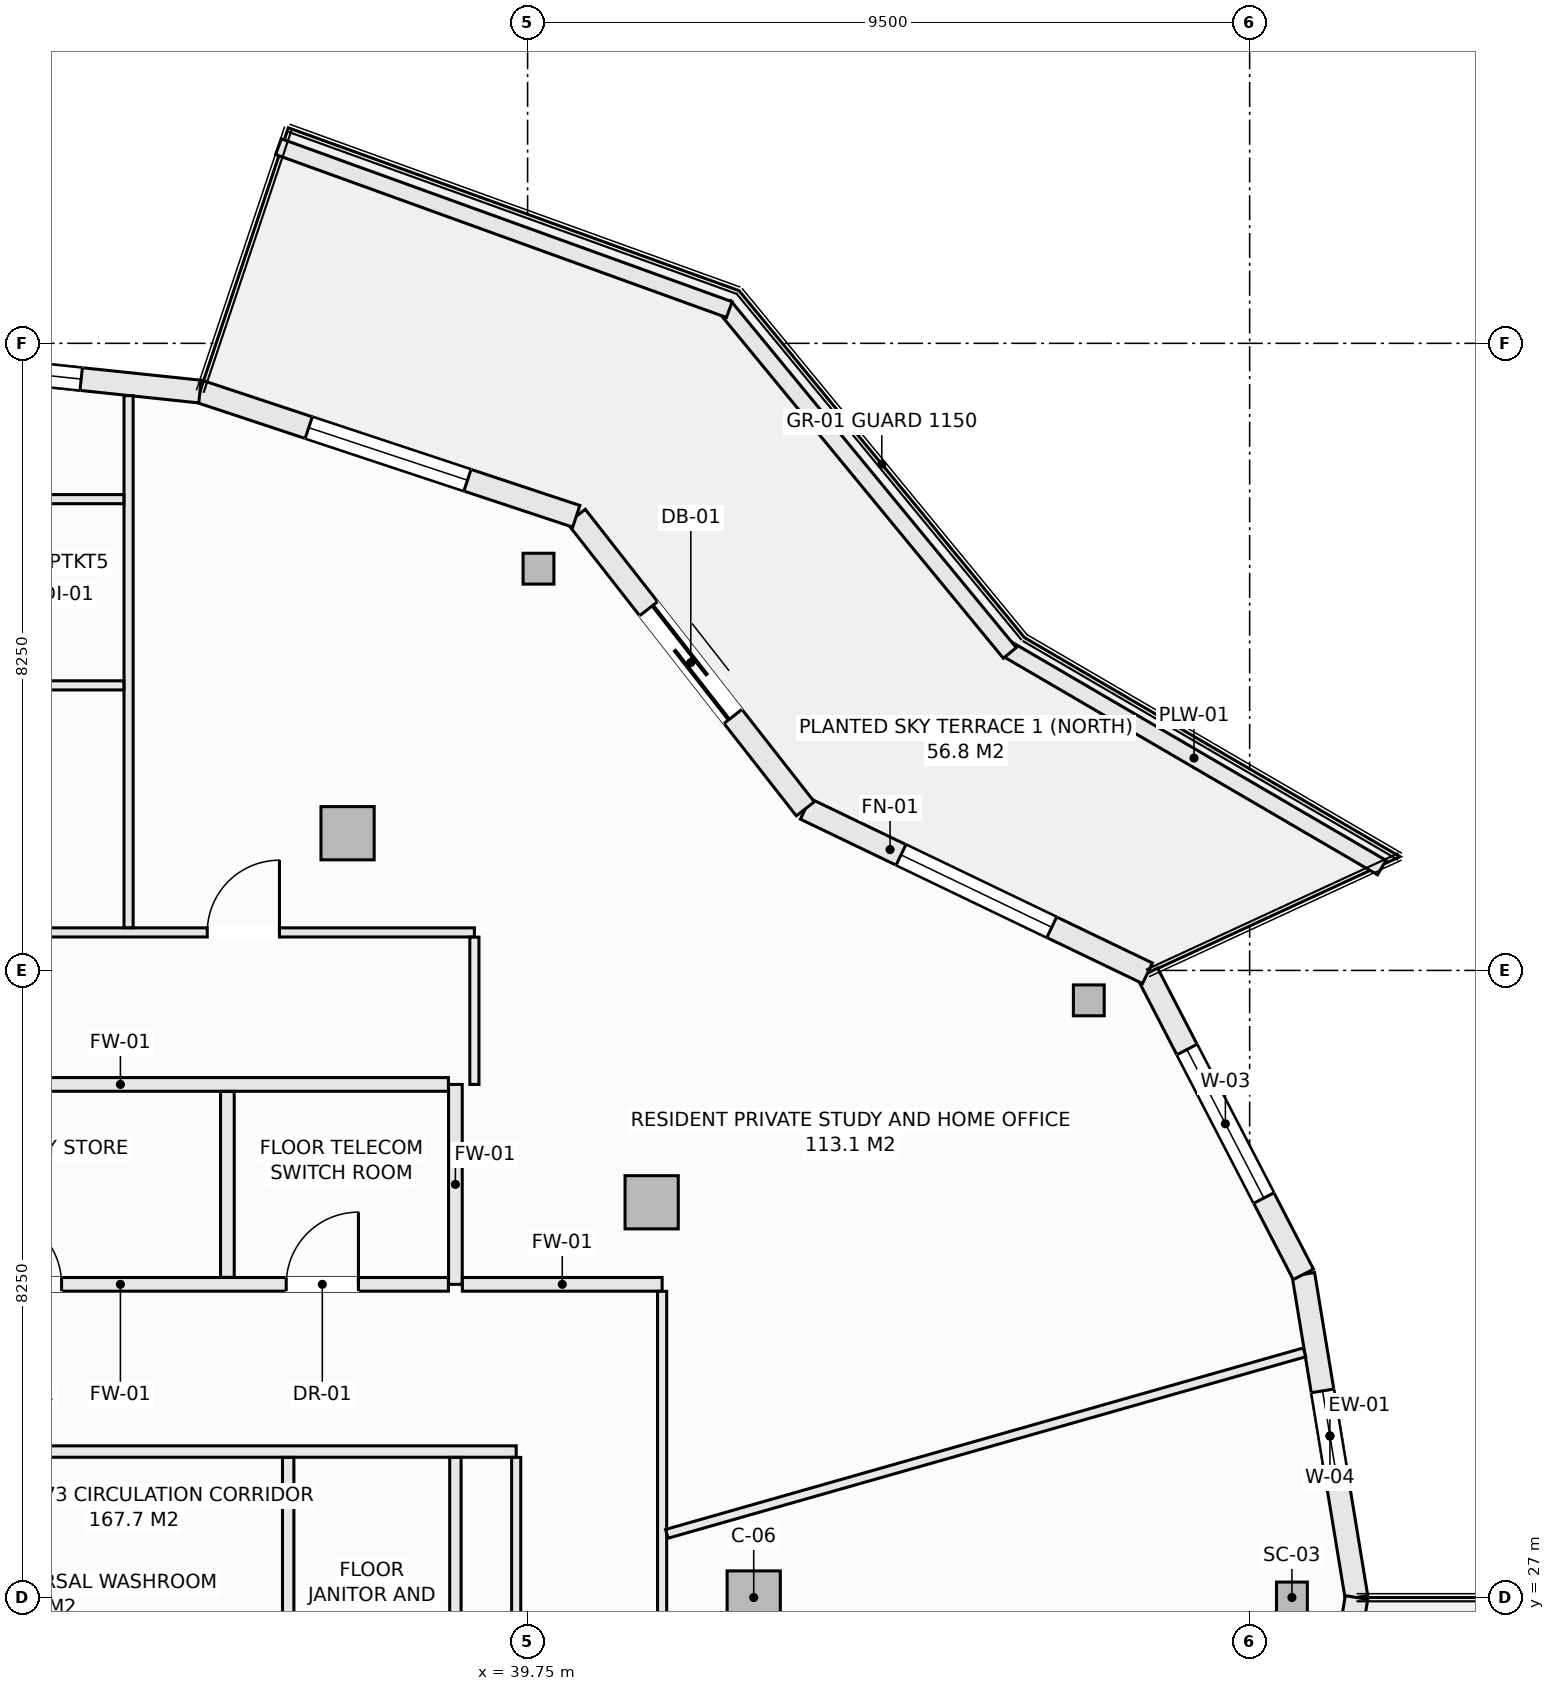
"""IFC4 building model, lengths in metres.
Left out: names, types, materials, properties, quantities, classifications, styles, units other than length and angle.
Written with IfcOpenShell. Run it as: python <this file> out.ifc"""

import sys

from ifc_helpers import new_model, si_unit, direction, frame, frame_2d, origin, origin_2d, place, context, subcontext, project, spatial, rectangle, hollow_rectangle, extrude, element, fill, save


model = new_model("IFC4")
c1 = context("Model", 3, precision=1e-05, world=origin(), true_north=direction((0.0, 1.0)))
c2 = subcontext(c1, "Body", "Model", "MODEL_VIEW")
j1 = project(units=[si_unit("LENGTHUNIT", "METRE"), si_unit("PLANEANGLEUNIT", "RADIAN")], contexts=[c1])
p1 = place(None, origin())
s1 = spatial("IfcSite", under=j1, at=p1, CompositionType="ELEMENT")
p2 = place(p1, origin())
s2 = spatial("IfcBuilding", under=s1, at=p2, CompositionType="ELEMENT")
p3 = place(p2, frame((0.0, 0.0, 269.0)))
s3 = spatial("IfcBuildingStorey", under=s2, at=p3, CompositionType="ELEMENT", Elevation=269.0)
for number, where, z_axis, x_axis in (
    (1, (49.806, 27.0, -0.27), (0.0, 0.0, 1.0), (1.0, 0.0, 0.0)),
    (2, (47.134, 34.856, -0.27), (0.0, 0.0, 1.0), (1.0, 0.0, 0.0)),
    (3, (39.893, 40.535, -0.27), (0.0, 0.0, 1.0), (1.0, 0.0, 0.0)),
):
    element("IfcColumn", number, at=place(p3, frame(where, z_axis=z_axis, x_axis=x_axis)), inside=s3, PredefinedType="COLUMN", context=c2, shape_type="SweptSolid", body=[
        extrude(hollow_rectangle(XDim=0.406, YDim=0.406, WallThickness=0.016, at=origin_2d()), origin(), (0.0, 0.0, 1.0), 3.3),
    ])
for number, where, z_axis, x_axis in (
    (4, (42.725, 27.0, -0.27), (0.0, 0.0, 1.0), (1.0, 0.0, 0.0)),
    (5, (41.382, 32.199, -0.27), (0.0, 0.0, 1.0), (1.0, 0.0, 0.0)),
    (6, (37.382, 37.055, -0.27), (0.0, 0.0, 1.0), (1.0, 0.0, 0.0)),
):
    element("IfcColumn", number, at=place(p3, frame(where, z_axis=z_axis, x_axis=x_axis)), inside=s3, PredefinedType="COLUMN", context=c2, shape_type="SweptSolid", body=[
        extrude(rectangle(XDim=0.7, YDim=0.7, at=origin_2d()), origin(), (0.0, 0.0, 1.0), 3.3),
    ])
p4 = place(p3, frame((49.957, 31.251, 0.0), z_axis=(0.0, 0.0, 1.0), x_axis=(0.162404622434, -0.98672424649, 0.0)))
e7 = element("IfcWall", 7, at=p4, inside=s3, PredefinedType="SOLIDWALL", context=c2, shape_type="SweptSolid", body=[
    extrude(rectangle(XDim=4.308, YDim=0.3, at=frame_2d((2.154, 0.0))), origin(), (0.0, 0.0, 1.0), 2.605),
])
p5 = place(p4, frame((1.554, 0.0, 0.72)))
e8 = element("IfcOpeningElement", 8, at=p5, cuts=e7, PredefinedType="OPENING", context=c2, shape_type="SweptSolid", body=[
    extrude(rectangle(XDim=1.2, YDim=1.65, at=frame_2d((0.6, 0.825))), frame((0.0, 0.16, 0.0), z_axis=(0.0, -1.0, 0.0), x_axis=(1.0, 0.0, 0.0)), (0.0, 0.0, 1.0), 0.32),
])
p6 = place(p3, frame((47.906, 35.212, 0.0), z_axis=(0.0, 0.0, 1.0), x_axis=(0.459801070243, -0.888021945564, 0.0)))
e9 = element("IfcWall", 9, at=p6, inside=s3, PredefinedType="SOLIDWALL", context=c2, shape_type="SweptSolid", body=[
    extrude(rectangle(XDim=4.461, YDim=0.3, at=frame_2d((2.23, 0.0))), origin(), (0.0, 0.0, 1.0), 2.605),
])
p7 = place(p6, frame((1.13, 0.0, 0.72)))
e10 = element("IfcOpeningElement", 10, at=p7, cuts=e9, PredefinedType="OPENING", context=c2, shape_type="SweptSolid", body=[
    extrude(rectangle(XDim=2.2, YDim=1.65, at=frame_2d((1.1, 0.825))), frame((0.0, 0.16, 0.0), z_axis=(0.0, -1.0, 0.0), x_axis=(1.0, 0.0, 0.0)), (0.0, 0.0, 1.0), 0.32),
])
p8 = place(p3, frame((43.404, 37.375, 0.0), z_axis=(0.0, 0.0, 1.0), x_axis=(0.901346013132, -0.433099716706, 0.0)))
e11 = element("IfcWall", 11, at=p8, inside=s3, PredefinedType="SOLIDWALL", context=c2, shape_type="SweptSolid", body=[
    extrude(rectangle(XDim=4.994, YDim=0.3, at=frame_2d((2.497, 0.0))), origin(), (0.0, 0.0, 1.0), 2.605),
])
p9 = place(p8, frame((1.397, 0.0, 0.72)))
e12 = element("IfcOpeningElement", 12, at=p9, cuts=e11, PredefinedType="OPENING", context=c2, shape_type="SweptSolid", body=[
    extrude(rectangle(XDim=2.2, YDim=1.65, at=frame_2d((1.1, 0.825))), frame((0.0, 0.16, 0.0), z_axis=(0.0, -1.0, 0.0), x_axis=(1.0, 0.0, 0.0)), (0.0, 0.0, 1.0), 0.32),
])
p10 = place(p3, frame((40.391, 41.225, 0.0), z_axis=(0.0, 0.0, 1.0), x_axis=(0.616413297421, -0.78742278781, 0.0)))
e13 = element("IfcWall", 13, at=p10, inside=s3, PredefinedType="SOLIDWALL", context=c2, shape_type="SweptSolid", body=[
    extrude(rectangle(XDim=4.888, YDim=0.3, at=frame_2d((2.444, 0.0))), origin(), (0.0, 0.0, 1.0), 2.605),
])
p11 = place(p10, frame((1.544, 0.0, 0.0)))
e14 = element("IfcOpeningElement", 14, at=p11, cuts=e13, PredefinedType="OPENING", context=c2, shape_type="SweptSolid", body=[
    extrude(rectangle(XDim=1.8, YDim=2.25, at=frame_2d((0.9, 1.125))), frame((0.0, 0.16, 0.0), z_axis=(0.0, -1.0, 0.0), x_axis=(1.0, 0.0, 0.0)), (0.0, 0.0, 1.0), 0.32),
])
p12 = place(p3, frame((35.439, 42.865, 0.0), z_axis=(0.0, 0.0, 1.0), x_axis=(0.949252744709, -0.314514271001, 0.0)))
e15 = element("IfcWall", 15, at=p12, inside=s3, PredefinedType="SOLIDWALL", context=c2, shape_type="SweptSolid", body=[
    extrude(rectangle(XDim=5.216, YDim=0.3, at=frame_2d((2.608, 0.0))), origin(), (0.0, 0.0, 1.0), 2.605),
])
p13 = place(p12, frame((1.508, 0.0, 0.72)))
e16 = element("IfcOpeningElement", 16, at=p13, cuts=e15, PredefinedType="OPENING", context=c2, shape_type="SweptSolid", body=[
    extrude(rectangle(XDim=2.2, YDim=1.65, at=frame_2d((1.1, 0.825))), frame((0.0, 0.16, 0.0), z_axis=(0.0, -1.0, 0.0), x_axis=(1.0, 0.0, 0.0)), (0.0, 0.0, 1.0), 0.32),
])
p14 = place(p3, frame((30.125, 43.425, 0.0), z_axis=(0.0, 0.0, 1.0), x_axis=(0.9944966869, -0.104768028258, 0.0)))
e17 = element("IfcWall", 17, at=p14, inside=s3, PredefinedType="SOLIDWALL", context=c2, shape_type="SweptSolid", body=[
    extrude(rectangle(XDim=5.343, YDim=0.3, at=frame_2d((2.672, 0.0))), origin(), (0.0, 0.0, 1.0), 2.605),
])
p15 = place(p14, frame((1.572, 0.0, 0.72)))
e18 = element("IfcOpeningElement", 18, at=p15, cuts=e17, PredefinedType="OPENING", context=c2, shape_type="SweptSolid", body=[
    extrude(rectangle(XDim=2.2, YDim=1.65, at=frame_2d((1.1, 0.825))), frame((0.0, 0.16, 0.0), z_axis=(0.0, -1.0, 0.0), x_axis=(1.0, 0.0, 0.0)), (0.0, 0.0, 1.0), 0.32),
])
p16 = place(p3, frame((49.957, 22.749, 0.0), z_axis=(0.0, 0.0, 1.0), x_axis=(0.162404622434, 0.98672424649, 0.0)))
e19 = element("IfcWall", 19, at=p16, inside=s3, PredefinedType="SOLIDWALL", context=c2, shape_type="SweptSolid", body=[
    extrude(rectangle(XDim=4.308, YDim=0.3, at=frame_2d((2.154, 0.0))), origin(), (0.0, 0.0, 1.0), 2.605),
])
p17 = place(p16, frame((1.054, 0.0, 0.72)))
e20 = element("IfcOpeningElement", 20, at=p17, cuts=e19, PredefinedType="OPENING", context=c2, shape_type="SweptSolid", body=[
    extrude(rectangle(XDim=2.2, YDim=1.65, at=frame_2d((1.1, 0.825))), frame((0.0, 0.16, 0.0), z_axis=(0.0, -1.0, 0.0), x_axis=(1.0, 0.0, 0.0)), (0.0, 0.0, 1.0), 0.32),
])
p18 = place(p3, frame((46.048, 39.485, 0.0), z_axis=(0.0, 0.0, 1.0), x_axis=(0.863803671285, -0.503828559606, 0.0)))
e21 = element("IfcWall", 21, at=p18, inside=s3, PredefinedType="PARAPET", context=c2, shape_type="SweptSolid", body=[
    extrude(rectangle(XDim=5.719, YDim=0.22, at=frame_2d((2.86, 0.0))), origin(), (0.0, 0.0, 1.0), 0.52),
])
p19 = place(p3, frame((42.339, 43.99, 0.0), z_axis=(0.0, 0.0, 1.0), x_axis=(0.635450933862, -0.772141250455, 0.0)))
e22 = element("IfcWall", 22, at=p19, inside=s3, PredefinedType="PARAPET", context=c2, shape_type="SweptSolid", body=[
    extrude(rectangle(XDim=5.91, YDim=0.22, at=frame_2d((2.955, 0.0))), origin(), (0.0, 0.0, 1.0), 0.52),
])
p20 = place(p3, frame((36.473, 46.087, 0.0), z_axis=(0.0, 0.0, 1.0), x_axis=(0.940465240036, -0.339889882585, 0.0)))
e23 = element("IfcWall", 23, at=p20, inside=s3, PredefinedType="PARAPET", context=c2, shape_type="SweptSolid", body=[
    extrude(rectangle(XDim=6.307, YDim=0.22, at=frame_2d((3.153, 0.0))), origin(), (0.0, 0.0, 1.0), 0.52),
])
p21 = place(p3, frame((30.077, 28.92, 0.0), z_axis=(0.0, 0.0, 1.0), x_axis=(1.0, 0.0, 0.0)))
e24 = element("IfcWall", 24, at=p21, inside=s3, PredefinedType="PARTITIONING", context=c2, shape_type="SweptSolid", body=[
    extrude(rectangle(XDim=9.523, YDim=0.15, at=frame_2d((4.762, 0.0))), origin(), (0.0, 0.0, 1.0), 3.03),
])
for number, where, z_axis, x_axis in (
    (25, (36.6, 25.197, 0.0), (0.0, 0.0, 1.0), (0.0, 1.0, 0.0)),
    (26, (38.8, 25.197, 0.0), (0.0, 0.0, 1.0), (0.0, 1.0, 0.0)),
):
    element("IfcWall", number, at=place(p3, frame(where, z_axis=z_axis, x_axis=x_axis)), inside=s3, PredefinedType="PARTITIONING", context=c2, shape_type="SweptSolid", body=[
        extrude(rectangle(XDim=3.646, YDim=0.15, at=frame_2d((1.823, 0.0))), origin(), (0.0, 0.0, 1.0), 3.03),
    ])
p22 = place(p3, frame((38.8, 31.12, 0.0), z_axis=(0.0, 0.0, 1.0), x_axis=(0.0, 1.0, 0.0)))
e27 = element("IfcWall", 27, at=p22, inside=s3, PredefinedType="SOLIDWALL", context=c2, shape_type="SweptSolid", body=[
    extrude(rectangle(XDim=2.63, YDim=0.18, at=frame_2d((1.315, 0.0))), origin(), (0.0, 0.0, 1.0), 3.03),
])
p23 = place(p3, frame((30.077, 31.12, 0.0), z_axis=(0.0, 0.0, 1.0), x_axis=(1.0, 0.0, 0.0)))
e28 = element("IfcWall", 28, at=p23, inside=s3, PredefinedType="SOLIDWALL", context=c2, shape_type="SweptSolid", body=[
    extrude(rectangle(XDim=8.631, YDim=0.18, at=frame_2d((4.315, 0.0))), origin(), (0.0, 0.0, 1.0), 3.03),
])
p24 = place(p23, frame((2.592, 0.0, 0.0)))
e29 = element("IfcOpeningElement", 29, at=p24, cuts=e28, PredefinedType="OPENING", context=c2, shape_type="SweptSolid", body=[
    extrude(rectangle(XDim=0.95, YDim=2.1, at=frame_2d((0.475, 1.05))), frame((0.0, 0.1, 0.0), z_axis=(0.0, -1.0, 0.0), x_axis=(1.0, 0.0, 0.0)), (0.0, 0.0, 1.0), 0.2),
])
p25 = place(p23, frame((6.497, 0.0, 0.0)))
e30 = element("IfcOpeningElement", 30, at=p25, cuts=e28, PredefinedType="OPENING", context=c2, shape_type="SweptSolid", body=[
    extrude(rectangle(XDim=0.95, YDim=2.1, at=frame_2d((0.475, 1.05))), frame((0.0, 0.1, 0.0), z_axis=(0.0, -1.0, 0.0), x_axis=(1.0, 0.0, 0.0)), (0.0, 0.0, 1.0), 0.2),
])
p26 = place(p3, frame((38.892, 31.12, 0.0), z_axis=(0.0, 0.0, 1.0), x_axis=(1.0, 0.0, 0.0)))
e31 = element("IfcWall", 31, at=p26, inside=s3, PredefinedType="SOLIDWALL", context=c2, shape_type="SweptSolid", body=[
    extrude(rectangle(XDim=2.628, YDim=0.18, at=frame_2d((1.314, 0.0))), origin(), (0.0, 0.0, 1.0), 3.03),
])
p27 = place(p3, frame((30.077, 33.75, 0.0), z_axis=(0.0, 0.0, 1.0), x_axis=(1.0, 0.0, 0.0)))
e32 = element("IfcWall", 32, at=p27, inside=s3, PredefinedType="SOLIDWALL", context=c2, shape_type="SweptSolid", body=[
    extrude(rectangle(XDim=8.631, YDim=0.18, at=frame_2d((4.315, 0.0))), origin(), (0.0, 0.0, 1.0), 3.03),
])
p28 = place(p3, frame((35.8, 31.212, 0.0), z_axis=(0.0, 0.0, 1.0), x_axis=(0.0, 1.0, 0.0)))
e33 = element("IfcWall", 33, at=p28, inside=s3, PredefinedType="SOLIDWALL", context=c2, shape_type="SweptSolid", body=[
    extrude(rectangle(XDim=2.446, YDim=0.18, at=frame_2d((1.223, 0.0))), origin(), (0.0, 0.0, 1.0), 3.03),
])
p29 = place(p3, frame((30.062, 35.75, 0.0), z_axis=(0.0, 0.0, 1.0), x_axis=(1.0, 0.0, 0.0)))
e34 = element("IfcWall", 34, at=p29, inside=s3, PredefinedType="PARTITIONING", context=c2, shape_type="SweptSolid", body=[
    extrude(rectangle(XDim=8.988, YDim=0.12, at=frame_2d((4.494, 0.0))), origin(), (0.0, 0.0, 1.0), 2.478),
])
p30 = place(p29, frame((5.473, 0.0, 0.0)))
e35 = element("IfcOpeningElement", 35, at=p30, cuts=e34, PredefinedType="OPENING", context=c2, shape_type="SweptSolid", body=[
    extrude(rectangle(XDim=0.95, YDim=2.1, at=frame_2d((0.475, 1.05))), frame((0.0, 0.07, 0.0), z_axis=(0.0, -1.0, 0.0), x_axis=(1.0, 0.0, 0.0)), (0.0, 0.0, 1.0), 0.14),
])
p31 = place(p29, frame((1.949, 0.0, 0.0)))
e36 = element("IfcOpeningElement", 36, at=p31, cuts=e34, PredefinedType="OPENING", context=c2, shape_type="SweptSolid", body=[
    extrude(rectangle(XDim=0.95, YDim=2.1, at=frame_2d((0.475, 1.05))), frame((0.0, 0.07, 0.0), z_axis=(0.0, -1.0, 0.0), x_axis=(1.0, 0.0, 0.0)), (0.0, 0.0, 1.0), 0.14),
])
p32 = place(p3, frame((39.05, 33.75, 0.0), z_axis=(0.0, 0.0, 1.0), x_axis=(0.0, 1.0, 0.0)))
e37 = element("IfcWall", 37, at=p32, inside=s3, PredefinedType="PARTITIONING", context=c2, shape_type="SweptSolid", body=[
    extrude(rectangle(XDim=1.938, YDim=0.12, at=frame_2d((0.969, 0.0))), origin(), (0.0, 0.0, 1.0), 3.03),
])
p33 = place(p3, frame((41.52, 23.02, 0.0), z_axis=(0.0, 0.0, 1.0), x_axis=(0.0, 1.0, 0.0)))
e38 = element("IfcWall", 38, at=p33, inside=s3, PredefinedType="PARTITIONING", context=c2, shape_type="SweptSolid", body=[
    extrude(rectangle(XDim=8.008, YDim=0.12, at=frame_2d((4.004, 0.0))), origin(), (0.0, 0.0, 1.0), 2.478),
])
p34 = place(p33, frame((2.135, 0.0, 0.0)))
e39 = element("IfcOpeningElement", 39, at=p34, cuts=e38, PredefinedType="OPENING", context=c2, shape_type="SweptSolid", body=[
    extrude(rectangle(XDim=0.95, YDim=2.1, at=frame_2d((0.475, 1.05))), frame((0.0, 0.07, 0.0), z_axis=(0.0, -1.0, 0.0), x_axis=(1.0, 0.0, 0.0)), (0.0, 0.0, 1.0), 0.14),
])
p35 = place(p3, frame((39.6, 25.197, 0.0), z_axis=(0.0, 0.0, 1.0), x_axis=(0.0, 1.0, 0.0)))
e40 = element("IfcWall", 40, at=p35, inside=s3, PredefinedType="PARTITIONING", context=c2, shape_type="SweptSolid", body=[
    extrude(rectangle(XDim=3.646, YDim=0.12, at=frame_2d((1.823, 0.0))), origin(), (0.0, 0.0, 1.0), 3.03),
])
p36 = place(p3, frame((34.5, 35.812, 0.0), z_axis=(0.0, 0.0, 1.0), x_axis=(0.0, 1.0, 0.0)))
e41 = element("IfcWall", 41, at=p36, inside=s3, PredefinedType="PARTITIONING", context=c2, shape_type="SweptSolid", body=[
    extrude(rectangle(XDim=6.999, YDim=0.12, at=frame_2d((3.5, 0.0))), origin(), (0.0, 0.0, 1.0), 2.77),
])
p37 = place(p3, frame((41.582, 27.838, 0.0), z_axis=(0.0, 0.0, 1.0), x_axis=(0.961811765236, 0.273711761262, 0.0)))
e42 = element("IfcWall", 42, at=p37, inside=s3, PredefinedType="PARTITIONING", context=c2, shape_type="SweptSolid", body=[
    extrude(rectangle(XDim=8.722, YDim=0.12, at=frame_2d((4.361, 0.0))), origin(), (0.0, 0.0, 1.0), 3.03),
])
p38 = place(p3, frame((32.25, 41.45, 0.0), z_axis=(0.0, 0.0, 1.0), x_axis=(1.0, 0.0, 0.0)))
e43 = element("IfcWall", 43, at=p38, inside=s3, PredefinedType="PARTITIONING", context=c2, shape_type="SweptSolid", body=[
    extrude(rectangle(XDim=2.188, YDim=0.12, at=frame_2d((1.094, 0.0))), origin(), (0.0, 0.0, 1.0), 3.03),
])
p39 = place(p3, frame((32.312, 39.0, 0.0), z_axis=(0.0, 0.0, 1.0), x_axis=(1.0, 0.0, 0.0)))
e44 = element("IfcWall", 44, at=p39, inside=s3, PredefinedType="PARTITIONING", context=c2, shape_type="SweptSolid", body=[
    extrude(rectangle(XDim=2.126, YDim=0.12, at=frame_2d((1.063, 0.0))), origin(), (0.0, 0.0, 1.0), 3.03),
])
p40 = place(p5, origin())
e45 = element("IfcWindow", 45, at=p40, inside=s3, PartitioningType="SINGLE_PANEL", PredefinedType="WINDOW", context=c2, shape_type="SweptSolid", body=[
    extrude(rectangle(XDim=1.2, YDim=1.65, at=frame_2d((0.6, 0.825))), frame((0.0, 0.03, 0.0), z_axis=(0.0, -1.0, 0.0), x_axis=(1.0, 0.0, 0.0)), (0.0, 0.0, 1.0), 0.06),
])
fill(e8, e45)
p41 = place(p7, origin())
e46 = element("IfcWindow", 46, at=p41, inside=s3, PartitioningType="SINGLE_PANEL", PredefinedType="WINDOW", context=c2, shape_type="SweptSolid", body=[
    extrude(rectangle(XDim=2.2, YDim=1.65, at=frame_2d((1.1, 0.825))), frame((0.0, 0.03, 0.0), z_axis=(0.0, -1.0, 0.0), x_axis=(1.0, 0.0, 0.0)), (0.0, 0.0, 1.0), 0.06),
])
fill(e10, e46)
p42 = place(p9, origin())
e47 = element("IfcWindow", 47, at=p42, inside=s3, PartitioningType="SINGLE_PANEL", PredefinedType="WINDOW", context=c2, shape_type="SweptSolid", body=[
    extrude(rectangle(XDim=2.2, YDim=1.65, at=frame_2d((1.1, 0.825))), frame((0.0, 0.03, 0.0), z_axis=(0.0, -1.0, 0.0), x_axis=(1.0, 0.0, 0.0)), (0.0, 0.0, 1.0), 0.06),
])
fill(e12, e47)
p43 = place(p11, origin())
e48 = element("IfcDoor", 48, at=p43, inside=s3, OperationType="SLIDING_TO_LEFT", PredefinedType="DOOR", context=c2, shape_type="SweptSolid", body=[
    extrude(rectangle(XDim=1.8, YDim=2.25, at=frame_2d((0.9, 1.125))), frame((0.0, 0.025, 0.0), z_axis=(0.0, -1.0, 0.0), x_axis=(1.0, 0.0, 0.0)), (0.0, 0.0, 1.0), 0.05),
])
fill(e14, e48)
p44 = place(p13, origin())
e49 = element("IfcWindow", 49, at=p44, inside=s3, PartitioningType="SINGLE_PANEL", PredefinedType="WINDOW", context=c2, shape_type="SweptSolid", body=[
    extrude(rectangle(XDim=2.2, YDim=1.65, at=frame_2d((1.1, 0.825))), frame((0.0, 0.03, 0.0), z_axis=(0.0, -1.0, 0.0), x_axis=(1.0, 0.0, 0.0)), (0.0, 0.0, 1.0), 0.06),
])
fill(e16, e49)
p45 = place(p15, origin())
e50 = element("IfcWindow", 50, at=p45, inside=s3, PartitioningType="SINGLE_PANEL", PredefinedType="WINDOW", context=c2, shape_type="SweptSolid", body=[
    extrude(rectangle(XDim=2.2, YDim=1.65, at=frame_2d((1.1, 0.825))), frame((0.0, 0.03, 0.0), z_axis=(0.0, -1.0, 0.0), x_axis=(1.0, 0.0, 0.0)), (0.0, 0.0, 1.0), 0.06),
])
fill(e18, e50)
p46 = place(p24, origin())
e51 = element("IfcDoor", 51, at=p46, inside=s3, OperationType="SINGLE_SWING_LEFT", PredefinedType="DOOR", context=c2, shape_type="SweptSolid", body=[
    extrude(rectangle(XDim=0.95, YDim=2.1, at=frame_2d((0.475, 1.05))), frame((0.0, 0.025, 0.0), z_axis=(0.0, -1.0, 0.0), x_axis=(1.0, 0.0, 0.0)), (0.0, 0.0, 1.0), 0.05),
])
fill(e29, e51)
p47 = place(p25, origin())
e52 = element("IfcDoor", 52, at=p47, inside=s3, OperationType="SINGLE_SWING_RIGHT", PredefinedType="DOOR", context=c2, shape_type="SweptSolid", body=[
    extrude(rectangle(XDim=0.95, YDim=2.1, at=frame_2d((0.475, 1.05))), frame((0.0, 0.025, 0.0), z_axis=(0.0, -1.0, 0.0), x_axis=(1.0, 0.0, 0.0)), (0.0, 0.0, 1.0), 0.05),
])
fill(e30, e52)
p48 = place(p30, origin())
e53 = element("IfcDoor", 53, at=p48, inside=s3, OperationType="SINGLE_SWING_RIGHT", PredefinedType="DOOR", context=c2, shape_type="SweptSolid", body=[
    extrude(rectangle(XDim=0.95, YDim=2.1, at=frame_2d((0.475, 1.05))), frame((0.0, 0.025, 0.0), z_axis=(0.0, -1.0, 0.0), x_axis=(1.0, 0.0, 0.0)), (0.0, 0.0, 1.0), 0.05),
])
fill(e35, e53)
save(model, sys.argv[1])
